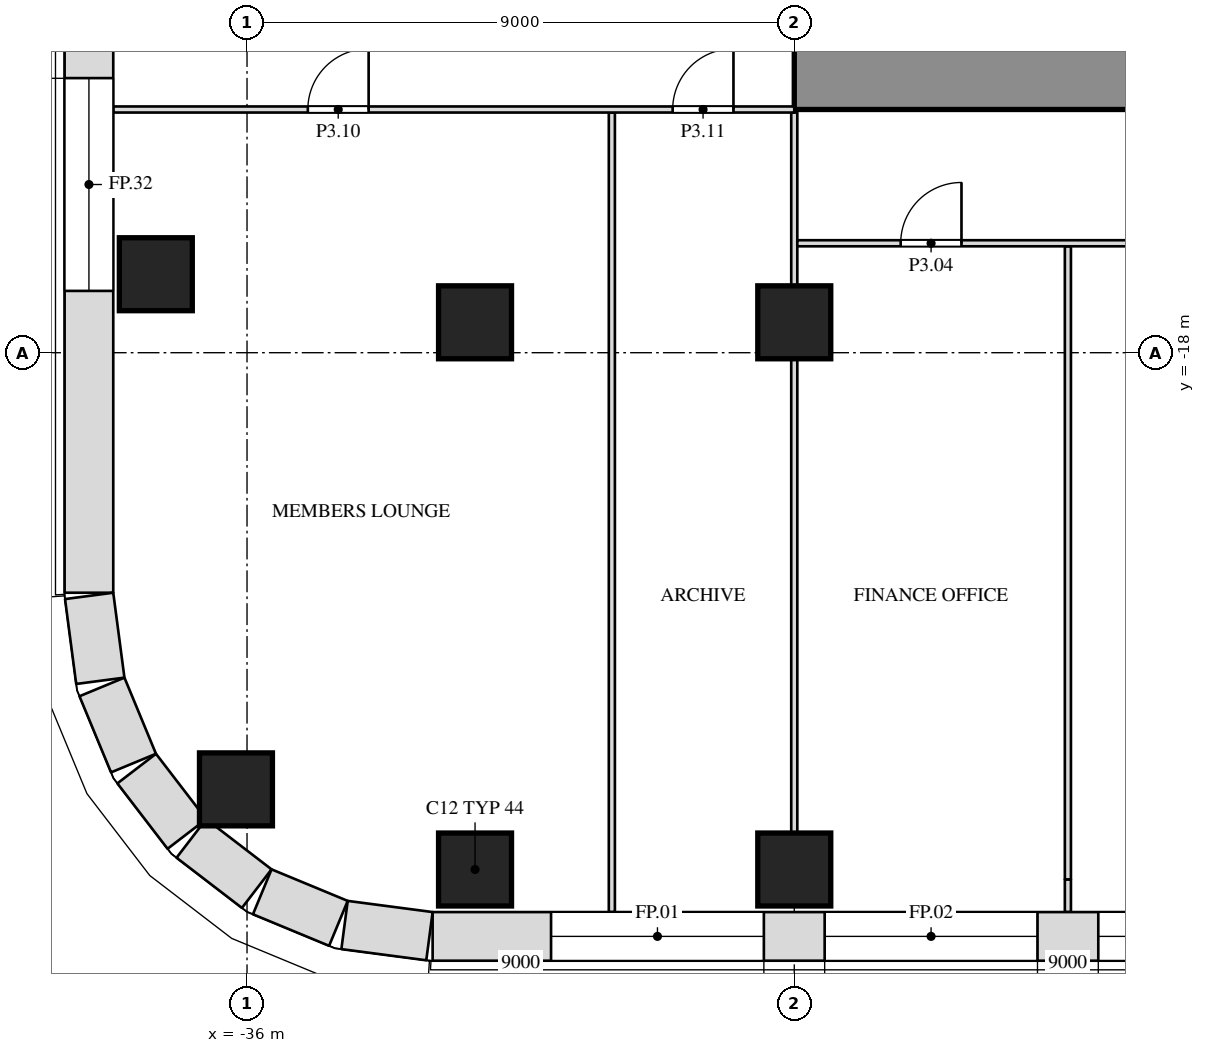
"""IFC4 building model, lengths in metres.
Left out: names, types, materials, properties, quantities, classifications, styles, units other than length and angle.
Written with IfcOpenShell. Run it as: python <this file> out.ifc"""

import sys

from ifc_helpers import new_model, si_unit, direction, frame, frame_2d, origin, origin_2d, place, context, subcontext, project, spatial, rectangle, extrude, element, fill, save


model = new_model("IFC4")
c1 = context("Model", 3, precision=1e-05, world=origin(), true_north=direction((0.0, 1.0)))
c2 = subcontext(c1, "Body", "Model", "MODEL_VIEW")
j1 = project(units=[si_unit("LENGTHUNIT", "METRE"), si_unit("PLANEANGLEUNIT", "RADIAN")], contexts=[c1])
p1 = place(None, origin())
s1 = spatial("IfcSite", under=j1, at=p1, CompositionType="ELEMENT")
p2 = place(p1, origin())
s2 = spatial("IfcBuilding", under=s1, at=p2, CompositionType="ELEMENT")
p3 = place(p2, frame((0.0, 0.0, 21.0)))
s3 = spatial("IfcBuildingStorey", under=s2, at=p3, CompositionType="ELEMENT", Elevation=21.0)
for number, where, z_axis, x_axis in (
    (1, (-32.25, -26.5, 0.0), (0.0, 0.0, 1.0), (1.0, 0.0, 0.0)),
    (2, (-27.0, -26.5, 0.0), (0.0, 0.0, 1.0), (1.0, 0.0, 0.0)),
    (3, (-36.182, -25.182, 0.0), (0.0, 0.0, 1.0), (1.0, 0.0, 0.0)),
    (4, (-32.25, -17.5, 0.0), (0.0, 0.0, 1.0), (1.0, 0.0, 0.0)),
    (5, (-27.0, -17.5, 0.0), (0.0, 0.0, 1.0), (1.0, 0.0, 0.0)),
    (6, (-37.5, -16.709, 0.0), (0.0, 0.0, 1.0), (1.0, 0.0, 0.0)),
):
    element("IfcColumn", number, at=place(p3, frame(where, z_axis=z_axis, x_axis=x_axis)), inside=s3, PredefinedType="COLUMN", context=c2, shape_type="SweptSolid", body=[
        extrude(rectangle(XDim=1.2, YDim=1.2, at=origin_2d()), origin(), (0.0, 0.0, 1.0), 6.0),
    ])
p4 = place(p3, frame((-27.0, -13.4, 0.0), z_axis=(0.0, 0.0, 1.0), x_axis=(1.0, 0.0, 0.0)))
e7 = element("IfcWall", 7, at=p4, inside=s3, PredefinedType="SHEAR", context=c2, shape_type="SweptSolid", body=[
    extrude(rectangle(XDim=54.0, YDim=1.2, at=frame_2d((27.0, 0.0))), origin(), (0.0, 0.0, 1.0), 5.7),
])
p5 = place(p4, frame((16.45, 0.0, 0.0)))
e8 = element("IfcOpeningElement", 8, at=p5, cuts=e7, PredefinedType="OPENING", context=c2, shape_type="SweptSolid", body=[
    extrude(rectangle(XDim=1.0, YDim=2.1, at=frame_2d((0.5, 1.05))), frame((0.0, 0.612, 0.0), z_axis=(0.0, -1.0, 0.0), x_axis=(1.0, 0.0, 0.0)), (0.0, 0.0, 1.0), 1.224),
])
p6 = place(p4, frame((36.55, 0.0, 0.0)))
e9 = element("IfcOpeningElement", 9, at=p6, cuts=e7, PredefinedType="OPENING", context=c2, shape_type="SweptSolid", body=[
    extrude(rectangle(XDim=1.0, YDim=2.1, at=frame_2d((0.5, 1.05))), frame((0.0, 0.612, 0.0), z_axis=(0.0, -1.0, 0.0), x_axis=(1.0, 0.0, 0.0)), (0.0, 0.0, 1.0), 1.224),
])
p7 = place(p3, frame((-30.0, -27.2, 0.0), z_axis=(0.0, 0.0, 1.0), x_axis=(0.0, 1.0, 0.0)))
e10 = element("IfcWall", 10, at=p7, inside=s3, PredefinedType="PARTITIONING", context=c2, shape_type="SweptSolid", body=[
    extrude(rectangle(XDim=13.15, YDim=0.1, at=frame_2d((6.575, 0.0))), origin(), (0.0, 0.0, 1.0), 5.7),
])
p8 = place(p3, frame((-27.0, -25.9, 0.0), z_axis=(0.0, 0.0, 1.0), x_axis=(0.0, 1.0, 0.0)))
e11 = element("IfcWall", 11, at=p8, inside=s3, PredefinedType="PARTITIONING", context=c2, shape_type="SweptSolid", body=[
    extrude(rectangle(XDim=7.8, YDim=0.1, at=frame_2d((3.9, 0.0))), origin(), (0.0, 0.0, 1.0), 5.088),
])
p9 = place(p3, frame((-27.0, -16.9, 0.0), z_axis=(0.0, 0.0, 1.0), x_axis=(0.0, 1.0, 0.0)))
e12 = element("IfcWall", 12, at=p9, inside=s3, PredefinedType="PARTITIONING", context=c2, shape_type="SweptSolid", body=[
    extrude(rectangle(XDim=2.85, YDim=0.1, at=frame_2d((1.425, 0.0))), origin(), (0.0, 0.0, 1.0), 5.088),
])
p10 = place(p3, frame((-22.5, -27.2, 0.0), z_axis=(0.0, 0.0, 1.0), x_axis=(0.0, 1.0, 0.0)))
e13 = element("IfcWall", 13, at=p10, inside=s3, PredefinedType="PARTITIONING", context=c2, shape_type="SweptSolid", body=[
    extrude(rectangle(XDim=0.537, YDim=0.1, at=frame_2d((0.269, 0.0))), origin(), (0.0, 0.0, 1.0), 5.7),
])
p11 = place(p3, frame((-22.5, -26.663, 0.0), z_axis=(0.0, 0.0, 1.0), x_axis=(0.0, 1.0, 0.0)))
e14 = element("IfcWall", 14, at=p11, inside=s3, PredefinedType="PARTITIONING", context=c2, shape_type="SweptSolid", body=[
    extrude(rectangle(XDim=10.413, YDim=0.1, at=frame_2d((5.206, 0.0))), origin(), (0.0, 0.0, 1.0), 5.088),
])
p12 = place(p3, frame((-26.95, -16.2, 0.0), z_axis=(0.0, 0.0, 1.0), x_axis=(1.0, 0.0, 0.0)))
e15 = element("IfcWall", 15, at=p12, inside=s3, PredefinedType="PARTITIONING", context=c2, shape_type="SweptSolid", body=[
    extrude(rectangle(XDim=18.05, YDim=0.1, at=frame_2d((9.025, 0.0))), origin(), (0.0, 0.0, 1.0), 5.7),
])
p13 = place(p12, frame((1.7, 0.0, 0.0)))
e16 = element("IfcOpeningElement", 16, at=p13, cuts=e15, PredefinedType="OPENING", context=c2, shape_type="SweptSolid", body=[
    extrude(rectangle(XDim=1.0, YDim=2.1, at=frame_2d((0.5, 1.05))), frame((0.0, 0.062, 0.0), z_axis=(0.0, -1.0, 0.0), x_axis=(1.0, 0.0, 0.0)), (0.0, 0.0, 1.0), 0.124),
])
p14 = place(p12, frame((10.7, 0.0, 0.0)))
e17 = element("IfcOpeningElement", 17, at=p14, cuts=e15, PredefinedType="OPENING", context=c2, shape_type="SweptSolid", body=[
    extrude(rectangle(XDim=1.0, YDim=2.1, at=frame_2d((0.5, 1.05))), frame((0.0, 0.062, 0.0), z_axis=(0.0, -1.0, 0.0), x_axis=(1.0, 0.0, 0.0)), (0.0, 0.0, 1.0), 0.124),
])
p15 = place(p3, frame((-38.2, -14.0, 0.0), z_axis=(0.0, 0.0, 1.0), x_axis=(1.0, 0.0, 0.0)))
e18 = element("IfcWall", 18, at=p15, inside=s3, PredefinedType="PARTITIONING", context=c2, shape_type="SweptSolid", body=[
    extrude(rectangle(XDim=11.2, YDim=0.1, at=frame_2d((5.6, 0.0))), origin(), (0.0, 0.0, 1.0), 5.7),
])
p16 = place(p15, frame((3.2, 0.0, 0.0)))
e19 = element("IfcOpeningElement", 19, at=p16, cuts=e18, PredefinedType="OPENING", context=c2, shape_type="SweptSolid", body=[
    extrude(rectangle(XDim=1.0, YDim=2.1, at=frame_2d((0.5, 1.05))), frame((0.0, 0.062, 0.0), z_axis=(0.0, -1.0, 0.0), x_axis=(1.0, 0.0, 0.0)), (0.0, 0.0, 1.0), 0.124),
])
p17 = place(p15, frame((9.2, 0.0, 0.0)))
e20 = element("IfcOpeningElement", 20, at=p17, cuts=e18, PredefinedType="OPENING", context=c2, shape_type="SweptSolid", body=[
    extrude(rectangle(XDim=1.0, YDim=2.1, at=frame_2d((0.5, 1.05))), frame((0.0, 0.062, 0.0), z_axis=(0.0, -1.0, 0.0), x_axis=(1.0, 0.0, 0.0)), (0.0, 0.0, 1.0), 0.124),
])
p18 = place(p3, frame((-32.948, -27.6, 0.0), z_axis=(0.0, 0.0, 1.0), x_axis=(1.0, 0.0, 0.0)))
e21 = element("IfcWall", 21, at=p18, inside=s3, PredefinedType="SOLIDWALL", context=c2, shape_type="SweptSolid", body=[
    extrude(rectangle(XDim=65.895, YDim=0.8, at=frame_2d((32.948, 0.0))), origin(), (0.0, 0.0, 1.0), 5.7),
])
p19 = place(p18, frame((1.948, 0.0, 1.0)))
e22 = element("IfcOpeningElement", 22, at=p19, cuts=e21, PredefinedType="OPENING", context=c2, shape_type="SweptSolid", body=[
    extrude(rectangle(XDim=3.5, YDim=4.0, at=frame_2d((1.75, 2.0))), frame((0.0, 0.412, 0.0), z_axis=(0.0, -1.0, 0.0), x_axis=(1.0, 0.0, 0.0)), (0.0, 0.0, 1.0), 0.824),
])
p20 = place(p18, frame((6.448, 0.0, 1.0)))
e23 = element("IfcOpeningElement", 23, at=p20, cuts=e21, PredefinedType="OPENING", context=c2, shape_type="SweptSolid", body=[
    extrude(rectangle(XDim=3.5, YDim=4.0, at=frame_2d((1.75, 2.0))), frame((0.0, 0.412, 0.0), z_axis=(0.0, -1.0, 0.0), x_axis=(1.0, 0.0, 0.0)), (0.0, 0.0, 1.0), 0.824),
])
p21 = place(p18, frame((10.948, 0.0, 1.0)))
e24 = element("IfcOpeningElement", 24, at=p21, cuts=e21, PredefinedType="OPENING", context=c2, shape_type="SweptSolid", body=[
    extrude(rectangle(XDim=3.5, YDim=4.0, at=frame_2d((1.75, 2.0))), frame((0.0, 0.412, 0.0), z_axis=(0.0, -1.0, 0.0), x_axis=(1.0, 0.0, 0.0)), (0.0, 0.0, 1.0), 0.824),
])
p22 = place(p18, frame((15.448, 0.0, 1.0)))
e25 = element("IfcOpeningElement", 25, at=p22, cuts=e21, PredefinedType="OPENING", context=c2, shape_type="SweptSolid", body=[
    extrude(rectangle(XDim=3.5, YDim=4.0, at=frame_2d((1.75, 2.0))), frame((0.0, 0.412, 0.0), z_axis=(0.0, -1.0, 0.0), x_axis=(1.0, 0.0, 0.0)), (0.0, 0.0, 1.0), 0.824),
])
p23 = place(p18, frame((19.948, 0.0, 1.0)))
e26 = element("IfcOpeningElement", 26, at=p23, cuts=e21, PredefinedType="OPENING", context=c2, shape_type="SweptSolid", body=[
    extrude(rectangle(XDim=3.5, YDim=4.0, at=frame_2d((1.75, 2.0))), frame((0.0, 0.412, 0.0), z_axis=(0.0, -1.0, 0.0), x_axis=(1.0, 0.0, 0.0)), (0.0, 0.0, 1.0), 0.824),
])
p24 = place(p18, frame((24.448, 0.0, 1.0)))
e27 = element("IfcOpeningElement", 27, at=p24, cuts=e21, PredefinedType="OPENING", context=c2, shape_type="SweptSolid", body=[
    extrude(rectangle(XDim=3.5, YDim=4.0, at=frame_2d((1.75, 2.0))), frame((0.0, 0.412, 0.0), z_axis=(0.0, -1.0, 0.0), x_axis=(1.0, 0.0, 0.0)), (0.0, 0.0, 1.0), 0.824),
])
p25 = place(p18, frame((28.948, 0.0, 1.0)))
e28 = element("IfcOpeningElement", 28, at=p25, cuts=e21, PredefinedType="OPENING", context=c2, shape_type="SweptSolid", body=[
    extrude(rectangle(XDim=3.5, YDim=4.0, at=frame_2d((1.75, 2.0))), frame((0.0, 0.412, 0.0), z_axis=(0.0, -1.0, 0.0), x_axis=(1.0, 0.0, 0.0)), (0.0, 0.0, 1.0), 0.824),
])
p26 = place(p18, frame((33.448, 0.0, 1.0)))
e29 = element("IfcOpeningElement", 29, at=p26, cuts=e21, PredefinedType="OPENING", context=c2, shape_type="SweptSolid", body=[
    extrude(rectangle(XDim=3.5, YDim=4.0, at=frame_2d((1.75, 2.0))), frame((0.0, 0.412, 0.0), z_axis=(0.0, -1.0, 0.0), x_axis=(1.0, 0.0, 0.0)), (0.0, 0.0, 1.0), 0.824),
])
p27 = place(p18, frame((37.948, 0.0, 1.0)))
e30 = element("IfcOpeningElement", 30, at=p27, cuts=e21, PredefinedType="OPENING", context=c2, shape_type="SweptSolid", body=[
    extrude(rectangle(XDim=3.5, YDim=4.0, at=frame_2d((1.75, 2.0))), frame((0.0, 0.412, 0.0), z_axis=(0.0, -1.0, 0.0), x_axis=(1.0, 0.0, 0.0)), (0.0, 0.0, 1.0), 0.824),
])
p28 = place(p18, frame((42.448, 0.0, 1.0)))
e31 = element("IfcOpeningElement", 31, at=p28, cuts=e21, PredefinedType="OPENING", context=c2, shape_type="SweptSolid", body=[
    extrude(rectangle(XDim=3.5, YDim=4.0, at=frame_2d((1.75, 2.0))), frame((0.0, 0.412, 0.0), z_axis=(0.0, -1.0, 0.0), x_axis=(1.0, 0.0, 0.0)), (0.0, 0.0, 1.0), 0.824),
])
p29 = place(p18, frame((46.948, 0.0, 1.0)))
e32 = element("IfcOpeningElement", 32, at=p29, cuts=e21, PredefinedType="OPENING", context=c2, shape_type="SweptSolid", body=[
    extrude(rectangle(XDim=3.5, YDim=4.0, at=frame_2d((1.75, 2.0))), frame((0.0, 0.412, 0.0), z_axis=(0.0, -1.0, 0.0), x_axis=(1.0, 0.0, 0.0)), (0.0, 0.0, 1.0), 0.824),
])
p30 = place(p18, frame((51.448, 0.0, 1.0)))
e33 = element("IfcOpeningElement", 33, at=p30, cuts=e21, PredefinedType="OPENING", context=c2, shape_type="SweptSolid", body=[
    extrude(rectangle(XDim=3.5, YDim=4.0, at=frame_2d((1.75, 2.0))), frame((0.0, 0.412, 0.0), z_axis=(0.0, -1.0, 0.0), x_axis=(1.0, 0.0, 0.0)), (0.0, 0.0, 1.0), 0.824),
])
p31 = place(p18, frame((55.948, 0.0, 1.0)))
e34 = element("IfcOpeningElement", 34, at=p31, cuts=e21, PredefinedType="OPENING", context=c2, shape_type="SweptSolid", body=[
    extrude(rectangle(XDim=3.5, YDim=4.0, at=frame_2d((1.75, 2.0))), frame((0.0, 0.412, 0.0), z_axis=(0.0, -1.0, 0.0), x_axis=(1.0, 0.0, 0.0)), (0.0, 0.0, 1.0), 0.824),
])
p32 = place(p18, frame((60.448, 0.0, 1.0)))
e35 = element("IfcOpeningElement", 35, at=p32, cuts=e21, PredefinedType="OPENING", context=c2, shape_type="SweptSolid", body=[
    extrude(rectangle(XDim=3.5, YDim=4.0, at=frame_2d((1.75, 2.0))), frame((0.0, 0.412, 0.0), z_axis=(0.0, -1.0, 0.0), x_axis=(1.0, 0.0, 0.0)), (0.0, 0.0, 1.0), 0.824),
])
p33 = place(p3, frame((-38.6, 13.948, 0.0), z_axis=(0.0, 0.0, 1.0), x_axis=(0.0, -1.0, 0.0)))
e36 = element("IfcWall", 36, at=p33, inside=s3, PredefinedType="SOLIDWALL", context=c2, shape_type="SweptSolid", body=[
    extrude(rectangle(XDim=35.895, YDim=0.8, at=frame_2d((17.948, 0.0))), origin(), (0.0, 0.0, 1.0), 5.7),
])
p34 = place(p33, frame((4.964, 0.0, 1.0)))
e37 = element("IfcOpeningElement", 37, at=p34, cuts=e36, PredefinedType="OPENING", context=c2, shape_type="SweptSolid", body=[
    extrude(rectangle(XDim=3.5, YDim=4.0, at=frame_2d((1.75, 2.0))), frame((0.0, 0.412, 0.0), z_axis=(0.0, -1.0, 0.0), x_axis=(1.0, 0.0, 0.0)), (0.0, 0.0, 1.0), 0.824),
])
p35 = place(p33, frame((9.458, 0.0, 1.0)))
e38 = element("IfcOpeningElement", 38, at=p35, cuts=e36, PredefinedType="OPENING", context=c2, shape_type="SweptSolid", body=[
    extrude(rectangle(XDim=3.5, YDim=4.0, at=frame_2d((1.75, 2.0))), frame((0.0, 0.412, 0.0), z_axis=(0.0, -1.0, 0.0), x_axis=(1.0, 0.0, 0.0)), (0.0, 0.0, 1.0), 0.824),
])
p36 = place(p33, frame((13.951, 0.0, 1.0)))
e39 = element("IfcOpeningElement", 39, at=p36, cuts=e36, PredefinedType="OPENING", context=c2, shape_type="SweptSolid", body=[
    extrude(rectangle(XDim=3.5, YDim=4.0, at=frame_2d((1.75, 2.0))), frame((0.0, 0.412, 0.0), z_axis=(0.0, -1.0, 0.0), x_axis=(1.0, 0.0, 0.0)), (0.0, 0.0, 1.0), 0.824),
])
p37 = place(p33, frame((18.444, 0.0, 1.0)))
e40 = element("IfcOpeningElement", 40, at=p37, cuts=e36, PredefinedType="OPENING", context=c2, shape_type="SweptSolid", body=[
    extrude(rectangle(XDim=3.5, YDim=4.0, at=frame_2d((1.75, 2.0))), frame((0.0, 0.412, 0.0), z_axis=(0.0, -1.0, 0.0), x_axis=(1.0, 0.0, 0.0)), (0.0, 0.0, 1.0), 0.824),
])
p38 = place(p33, frame((22.938, 0.0, 1.0)))
e41 = element("IfcOpeningElement", 41, at=p38, cuts=e36, PredefinedType="OPENING", context=c2, shape_type="SweptSolid", body=[
    extrude(rectangle(XDim=3.5, YDim=4.0, at=frame_2d((1.75, 2.0))), frame((0.0, 0.412, 0.0), z_axis=(0.0, -1.0, 0.0), x_axis=(1.0, 0.0, 0.0)), (0.0, 0.0, 1.0), 0.824),
])
p39 = place(p33, frame((27.431, 0.0, 1.0)))
e42 = element("IfcOpeningElement", 42, at=p39, cuts=e36, PredefinedType="OPENING", context=c2, shape_type="SweptSolid", body=[
    extrude(rectangle(XDim=3.5, YDim=4.0, at=frame_2d((1.75, 2.0))), frame((0.0, 0.412, 0.0), z_axis=(0.0, -1.0, 0.0), x_axis=(1.0, 0.0, 0.0)), (0.0, 0.0, 1.0), 0.824),
])
p40 = place(p3, frame((-38.597, -22.0, 0.0), z_axis=(0.0, 0.0, 1.0), x_axis=(0.130517283865, -0.99144603414, 0.0)))
e43 = element("IfcWall", 43, at=p40, inside=s3, PredefinedType="SOLIDWALL", context=c2, shape_type="SweptSolid", body=[
    extrude(rectangle(XDim=1.408, YDim=0.8, at=frame_2d((0.704, 0.0))), origin(), (0.0, 0.0, 1.0), 5.7),
])
p41 = place(p3, frame((-38.386, -23.497, 0.0), z_axis=(0.0, 0.0, 1.0), x_axis=(0.38276009378, -0.923847774587, 0.0)))
e44 = element("IfcWall", 44, at=p41, inside=s3, PredefinedType="SOLIDWALL", context=c2, shape_type="SweptSolid", body=[
    extrude(rectangle(XDim=1.355, YDim=0.8, at=frame_2d((0.678, 0.0))), origin(), (0.0, 0.0, 1.0), 5.7),
])
for number, where, z_axis, x_axis in (
    (45, (-37.815, -24.84, 0.0), (0.0, 0.0, 1.0), (0.609, -0.793, 0.0)),
    (46, (-36.916, -25.989, 0.0), (0.0, 0.0, 1.0), (0.793, -0.609, 0.0)),
):
    element("IfcWall", number, at=place(p3, frame(where, z_axis=z_axis, x_axis=x_axis)), inside=s3, PredefinedType="SOLIDWALL", context=c2, shape_type="SweptSolid", body=[
        extrude(rectangle(XDim=1.356, YDim=0.8, at=frame_2d((0.678, 0.0))), origin(), (0.0, 0.0, 1.0), 5.7),
    ])
p42 = place(p3, frame((-35.75, -26.867, 0.0), z_axis=(0.0, 0.0, 1.0), x_axis=(0.923847774587, -0.38276009378, 0.0)))
e47 = element("IfcWall", 47, at=p42, inside=s3, PredefinedType="SOLIDWALL", context=c2, shape_type="SweptSolid", body=[
    extrude(rectangle(XDim=1.355, YDim=0.8, at=frame_2d((0.678, 0.0))), origin(), (0.0, 0.0, 1.0), 5.7),
])
p43 = place(p3, frame((-34.396, -27.413, 0.0), z_axis=(0.0, 0.0, 1.0), x_axis=(0.99144603414, -0.130517283865, 0.0)))
e48 = element("IfcWall", 48, at=p43, inside=s3, PredefinedType="SOLIDWALL", context=c2, shape_type="SweptSolid", body=[
    extrude(rectangle(XDim=1.408, YDim=0.8, at=frame_2d((0.704, 0.0))), origin(), (0.0, 0.0, 1.0), 5.7),
])
p44 = place(p13, origin())
e49 = element("IfcDoor", 49, at=p44, inside=s3, OperationType="SINGLE_SWING_RIGHT", PredefinedType="DOOR", context=c2, shape_type="SweptSolid", body=[
    extrude(rectangle(XDim=1.0, YDim=2.1, at=frame_2d((0.5, 1.05))), frame((0.0, 0.025, 0.0), z_axis=(0.0, -1.0, 0.0), x_axis=(1.0, 0.0, 0.0)), (0.0, 0.0, 1.0), 0.05),
])
fill(e16, e49)
p45 = place(p16, origin())
e50 = element("IfcDoor", 50, at=p45, inside=s3, OperationType="SINGLE_SWING_RIGHT", PredefinedType="DOOR", context=c2, shape_type="SweptSolid", body=[
    extrude(rectangle(XDim=1.0, YDim=2.1, at=frame_2d((0.5, 1.05))), frame((0.0, 0.025, 0.0), z_axis=(0.0, -1.0, 0.0), x_axis=(1.0, 0.0, 0.0)), (0.0, 0.0, 1.0), 0.05),
])
fill(e19, e50)
p46 = place(p17, origin())
e51 = element("IfcDoor", 51, at=p46, inside=s3, OperationType="SINGLE_SWING_RIGHT", PredefinedType="DOOR", context=c2, shape_type="SweptSolid", body=[
    extrude(rectangle(XDim=1.0, YDim=2.1, at=frame_2d((0.5, 1.05))), frame((0.0, 0.025, 0.0), z_axis=(0.0, -1.0, 0.0), x_axis=(1.0, 0.0, 0.0)), (0.0, 0.0, 1.0), 0.05),
])
fill(e20, e51)
p47 = place(p19, origin())
e52 = element("IfcWindow", 52, at=p47, inside=s3, PartitioningType="SINGLE_PANEL", PredefinedType="WINDOW", context=c2, shape_type="SweptSolid", body=[
    extrude(rectangle(XDim=3.5, YDim=4.0, at=frame_2d((1.75, 2.0))), frame((0.0, 0.03, 0.0), z_axis=(0.0, -1.0, 0.0), x_axis=(1.0, 0.0, 0.0)), (0.0, 0.0, 1.0), 0.06),
])
fill(e22, e52)
p48 = place(p20, origin())
e53 = element("IfcWindow", 53, at=p48, inside=s3, PartitioningType="SINGLE_PANEL", PredefinedType="WINDOW", context=c2, shape_type="SweptSolid", body=[
    extrude(rectangle(XDim=3.5, YDim=4.0, at=frame_2d((1.75, 2.0))), frame((0.0, 0.03, 0.0), z_axis=(0.0, -1.0, 0.0), x_axis=(1.0, 0.0, 0.0)), (0.0, 0.0, 1.0), 0.06),
])
fill(e23, e53)
p49 = place(p21, origin())
e54 = element("IfcWindow", 54, at=p49, inside=s3, PartitioningType="SINGLE_PANEL", PredefinedType="WINDOW", context=c2, shape_type="SweptSolid", body=[
    extrude(rectangle(XDim=3.5, YDim=4.0, at=frame_2d((1.75, 2.0))), frame((0.0, 0.03, 0.0), z_axis=(0.0, -1.0, 0.0), x_axis=(1.0, 0.0, 0.0)), (0.0, 0.0, 1.0), 0.06),
])
fill(e24, e54)
p50 = place(p39, origin())
e55 = element("IfcWindow", 55, at=p50, inside=s3, PartitioningType="SINGLE_PANEL", PredefinedType="WINDOW", context=c2, shape_type="SweptSolid", body=[
    extrude(rectangle(XDim=3.5, YDim=4.0, at=frame_2d((1.75, 2.0))), frame((0.0, 0.03, 0.0), z_axis=(0.0, -1.0, 0.0), x_axis=(1.0, 0.0, 0.0)), (0.0, 0.0, 1.0), 0.06),
])
fill(e42, e55)
save(model, sys.argv[1])
